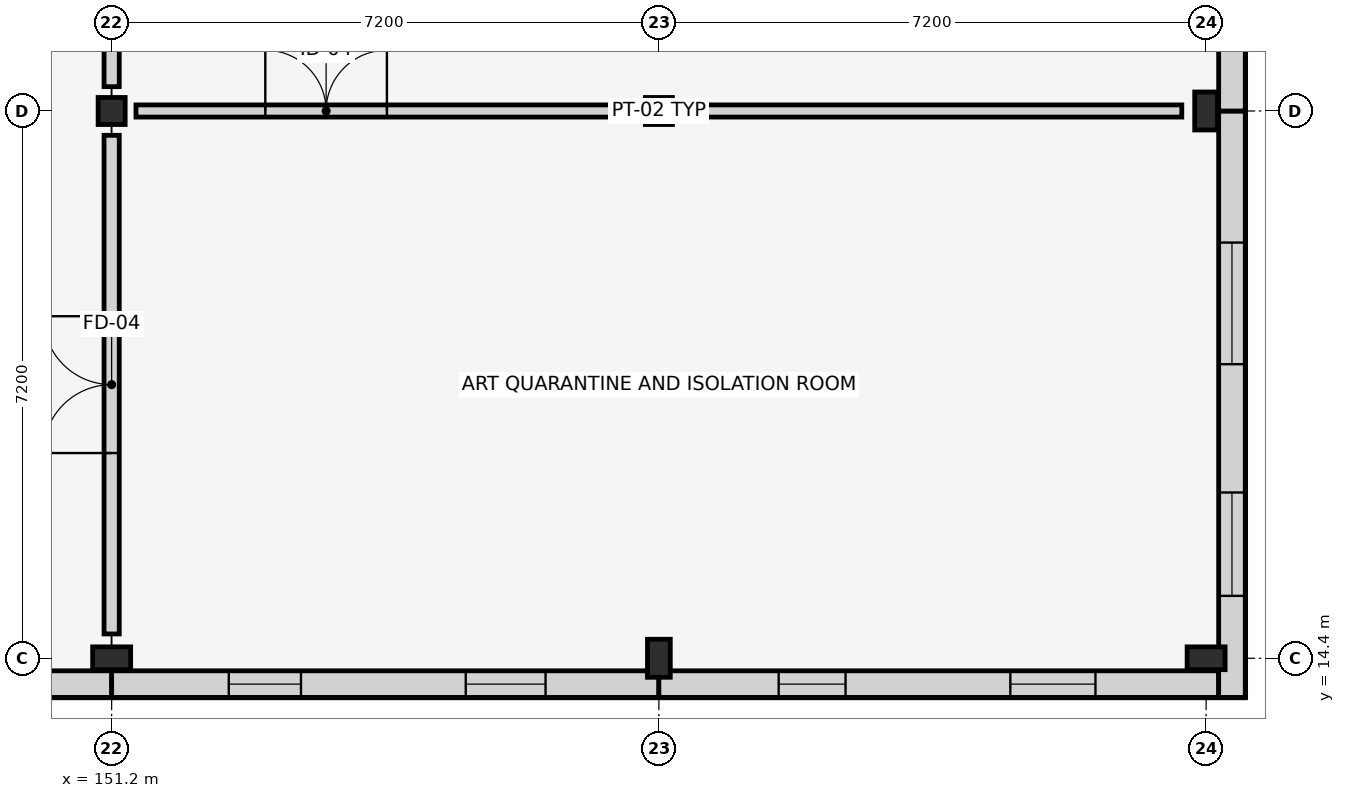
"""IFC4 building model, lengths in metres.
Left out: names, types, materials, properties, quantities, classifications, styles, units other than length and angle.
Written with IfcOpenShell. Run it as: python <this file> out.ifc"""

import sys

from ifc_helpers import new_model, si_unit, direction, frame, frame_2d, origin, origin_2d, place, context, subcontext, project, spatial, rectangle, hollow_circle, i_section, extrude, element, fill, save


model = new_model("IFC4")
c1 = context("Model", 3, precision=1e-05, world=origin(), true_north=direction((0.0, 1.0)))
c2 = subcontext(c1, "Body", "Model", "MODEL_VIEW")
j1 = project(units=[si_unit("LENGTHUNIT", "METRE"), si_unit("PLANEANGLEUNIT", "RADIAN")], contexts=[c1])
p1 = place(None, origin())
s1 = spatial("IfcSite", under=j1, at=p1, CompositionType="ELEMENT")
p2 = place(p1, origin())
s2 = spatial("IfcBuilding", under=s1, at=p2, CompositionType="ELEMENT")
p3 = place(p2, origin())
s3 = spatial("IfcBuildingStorey", under=s2, at=p3, CompositionType="ELEMENT", Elevation=0.0)
p4 = place(p3, frame((151.2, 14.4, 0.0), z_axis=(0.0, 0.0, 1.0), x_axis=(0.0, 1.0, 0.0)))
e1 = element("IfcColumn", 1, at=p4, inside=s3, PredefinedType="COLUMN", context=c2, shape_type="SweptSolid", body=[
    extrude(i_section(OverallWidth=0.3, OverallDepth=0.5, WebThickness=0.014, FlangeThickness=0.028, FilletRadius=0.027, at=origin_2d()), origin(), (0.0, 0.0, 1.0), 4.5),
])
p5 = place(p3, frame((151.2, 21.6, 0.0), z_axis=(0.0, 0.0, 1.0), x_axis=(1.0, 0.0, 0.0)))
e2 = element("IfcColumn", 2, at=p5, inside=s3, PredefinedType="COLUMN", context=c2, shape_type="SweptSolid", body=[
    extrude(hollow_circle(Radius=0.178, WallThickness=0.014, at=origin_2d()), origin(), (0.0, 0.0, 1.0), 4.5),
])
p6 = place(p3, frame((158.4, 14.4, 0.0), z_axis=(0.0, 0.0, 1.0), x_axis=(1.0, 0.0, 0.0)))
e3 = element("IfcColumn", 3, at=p6, inside=s3, PredefinedType="COLUMN", context=c2, shape_type="SweptSolid", body=[
    extrude(i_section(OverallWidth=0.3, OverallDepth=0.5, WebThickness=0.014, FlangeThickness=0.028, FilletRadius=0.027, at=origin_2d()), origin(), (0.0, 0.0, 1.0), 4.5),
])
p7 = place(p3, frame((158.4, 21.6, 0.0), z_axis=(0.0, 0.0, 1.0), x_axis=(0.0, 1.0, 0.0)))
e4 = element("IfcColumn", 4, at=p7, inside=s3, PredefinedType="COLUMN", context=c2, shape_type="SweptSolid", body=[
    extrude(hollow_circle(Radius=0.178, WallThickness=0.014, at=origin_2d()), origin(), (0.0, 0.0, 1.0), 4.5),
])
for number, where, z_axis, x_axis in (
    (5, (165.6, 14.4, 0.0), (0.0, 0.0, 1.0), (0.0, 1.0, 0.0)),
    (6, (165.6, 21.6, 0.0), (0.0, 0.0, 1.0), (1.0, 0.0, 0.0)),
):
    element("IfcColumn", number, at=place(p3, frame(where, z_axis=z_axis, x_axis=x_axis)), inside=s3, PredefinedType="COLUMN", context=c2, shape_type="SweptSolid", body=[
        extrude(i_section(OverallWidth=0.3, OverallDepth=0.5, WebThickness=0.014, FlangeThickness=0.028, FilletRadius=0.027, at=origin_2d()), origin(), (0.0, 0.0, 1.0), 4.5),
    ])
p8 = place(p3, frame((144.0, 14.06, 0.0), z_axis=(0.0, 0.0, 1.0), x_axis=(1.0, 0.0, 0.0)))
e7 = element("IfcWall", 7, at=p8, inside=s3, PredefinedType="STANDARD", context=c2, shape_type="SweptSolid", body=[
    extrude(rectangle(XDim=7.2, YDim=0.35, at=frame_2d((3.6, 0.0))), origin(), (0.0, 0.0, 1.0), 4.5),
])
p9 = place(p8, frame((1.241, 0.0, 0.9)))
e8 = element("IfcOpeningElement", 8, at=p9, cuts=e7, PredefinedType="OPENING", context=c2, shape_type="SweptSolid", body=[
    extrude(rectangle(XDim=1.55, YDim=2.35, at=frame_2d((0.775, 1.175))), frame((0.0, 0.185, 0.0), z_axis=(0.0, -1.0, 0.0), x_axis=(1.0, 0.0, 0.0)), (0.0, 0.0, 1.0), 0.37),
])
p10 = place(p8, frame((4.334, 0.0, 0.9)))
e9 = element("IfcOpeningElement", 9, at=p10, cuts=e7, PredefinedType="OPENING", context=c2, shape_type="SweptSolid", body=[
    extrude(rectangle(XDim=1.7, YDim=2.4, at=frame_2d((0.85, 1.2))), frame((0.0, 0.185, 0.0), z_axis=(0.0, -1.0, 0.0), x_axis=(1.0, 0.0, 0.0)), (0.0, 0.0, 1.0), 0.37),
])
p11 = place(p3, frame((151.2, 14.06, 0.0), z_axis=(0.0, 0.0, 1.0), x_axis=(1.0, 0.0, 0.0)))
e10 = element("IfcWall", 10, at=p11, inside=s3, PredefinedType="STANDARD", context=c2, shape_type="SweptSolid", body=[
    extrude(rectangle(XDim=7.2, YDim=0.35, at=frame_2d((3.6, 0.0))), origin(), (0.0, 0.0, 1.0), 4.5),
])
p12 = place(p11, frame((1.541, 0.0, 0.9)))
e11 = element("IfcOpeningElement", 11, at=p12, cuts=e10, PredefinedType="OPENING", context=c2, shape_type="SweptSolid", body=[
    extrude(rectangle(XDim=0.95, YDim=1.9, at=frame_2d((0.475, 0.95))), frame((0.0, 0.185, 0.0), z_axis=(0.0, -1.0, 0.0), x_axis=(1.0, 0.0, 0.0)), (0.0, 0.0, 1.0), 0.37),
])
p13 = place(p11, frame((4.659, 0.0, 0.9)))
e12 = element("IfcOpeningElement", 12, at=p13, cuts=e10, PredefinedType="OPENING", context=c2, shape_type="SweptSolid", body=[
    extrude(rectangle(XDim=1.05, YDim=2.15, at=frame_2d((0.525, 1.075))), frame((0.0, 0.185, 0.0), z_axis=(0.0, -1.0, 0.0), x_axis=(1.0, 0.0, 0.0)), (0.0, 0.0, 1.0), 0.37),
])
p14 = place(p3, frame((158.4, 14.06, 0.0), z_axis=(0.0, 0.0, 1.0), x_axis=(1.0, 0.0, 0.0)))
e13 = element("IfcWall", 13, at=p14, inside=s3, PredefinedType="STANDARD", context=c2, shape_type="SweptSolid", body=[
    extrude(rectangle(XDim=7.365, YDim=0.35, at=frame_2d((3.683, 0.0))), origin(), (0.0, 0.0, 1.0), 4.5),
])
p15 = place(p14, frame((1.576, 0.0, 0.9)))
e14 = element("IfcOpeningElement", 14, at=p15, cuts=e13, PredefinedType="OPENING", context=c2, shape_type="SweptSolid", body=[
    extrude(rectangle(XDim=0.88, YDim=1.54, at=frame_2d((0.44, 0.77))), frame((0.0, 0.185, 0.0), z_axis=(0.0, -1.0, 0.0), x_axis=(1.0, 0.0, 0.0)), (0.0, 0.0, 1.0), 0.37),
])
p16 = place(p14, frame((4.624, 0.0, 0.9)))
e15 = element("IfcOpeningElement", 15, at=p16, cuts=e13, PredefinedType="OPENING", context=c2, shape_type="SweptSolid", body=[
    extrude(rectangle(XDim=1.12, YDim=1.54, at=frame_2d((0.56, 0.77))), frame((0.0, 0.185, 0.0), z_axis=(0.0, -1.0, 0.0), x_axis=(1.0, 0.0, 0.0)), (0.0, 0.0, 1.0), 0.37),
])
p17 = place(p3, frame((165.94, 13.885, 0.0), z_axis=(0.0, 0.0, 1.0), x_axis=(0.0, 1.0, 0.0)))
e16 = element("IfcWall", 16, at=p17, inside=s3, PredefinedType="STANDARD", context=c2, shape_type="SweptSolid", body=[
    extrude(rectangle(XDim=7.715, YDim=0.35, at=frame_2d((3.857, 0.0))), origin(), (0.0, 0.0, 1.0), 4.5),
])
p18 = place(p17, frame((1.336, 0.0, 0.9)))
e17 = element("IfcOpeningElement", 17, at=p18, cuts=e16, PredefinedType="OPENING", context=c2, shape_type="SweptSolid", body=[
    extrude(rectangle(XDim=1.36, YDim=1.54, at=frame_2d((0.68, 0.77))), frame((0.0, 0.185, 0.0), z_axis=(0.0, -1.0, 0.0), x_axis=(1.0, 0.0, 0.0)), (0.0, 0.0, 1.0), 0.37),
])
p19 = place(p17, frame((4.384, 0.0, 0.9)))
e18 = element("IfcOpeningElement", 18, at=p19, cuts=e16, PredefinedType="OPENING", context=c2, shape_type="SweptSolid", body=[
    extrude(rectangle(XDim=1.6, YDim=1.54, at=frame_2d((0.8, 0.77))), frame((0.0, 0.185, 0.0), z_axis=(0.0, -1.0, 0.0), x_axis=(1.0, 0.0, 0.0)), (0.0, 0.0, 1.0), 0.37),
])
p20 = place(p3, frame((165.94, 21.6, 0.0), z_axis=(0.0, 0.0, 1.0), x_axis=(0.0, 1.0, 0.0)))
e19 = element("IfcWall", 19, at=p20, inside=s3, PredefinedType="STANDARD", context=c2, shape_type="SweptSolid", body=[
    extrude(rectangle(XDim=7.2, YDim=0.35, at=frame_2d((3.6, 0.0))), origin(), (0.0, 0.0, 1.0), 4.5),
])
p21 = place(p20, frame((1.4, 0.0, 0.0)))
e20 = element("IfcOpeningElement", 20, at=p21, cuts=e19, PredefinedType="OPENING", context=c2, shape_type="SweptSolid", body=[
    extrude(rectangle(XDim=4.4, YDim=3.6, at=frame_2d((2.2, 1.8))), frame((0.0, 0.185, 0.0), z_axis=(0.0, -1.0, 0.0), x_axis=(1.0, 0.0, 0.0)), (0.0, 0.0, 1.0), 0.37),
])
p22 = place(p3, frame((151.2, 21.92, 0.0), z_axis=(0.0, 0.0, 1.0), x_axis=(0.0, 1.0, 0.0)))
e21 = element("IfcWall", 21, at=p22, inside=s3, PredefinedType="PARTITIONING", context=c2, shape_type="SweptSolid", body=[
    extrude(rectangle(XDim=13.76, YDim=0.2, at=frame_2d((6.88, 0.0))), origin(), (0.0, 0.0, 1.0), 3.45),
])
p23 = place(p22, frame((1.602, 0.0, 0.0)))
e22 = element("IfcOpeningElement", 22, at=p23, cuts=e21, PredefinedType="OPENING", context=c2, shape_type="SweptSolid", body=[
    extrude(rectangle(XDim=1.8, YDim=2.4, at=frame_2d((0.9, 1.2))), frame((0.0, 0.11, 0.0), z_axis=(0.0, -1.0, 0.0), x_axis=(1.0, 0.0, 0.0)), (0.0, 0.0, 1.0), 0.22),
])
p24 = place(p3, frame((151.52, 21.6, 0.0), z_axis=(0.0, 0.0, 1.0), x_axis=(1.0, 0.0, 0.0)))
e23 = element("IfcWall", 23, at=p24, inside=s3, PredefinedType="PARTITIONING", context=c2, shape_type="SweptSolid", body=[
    extrude(rectangle(XDim=13.76, YDim=0.16, at=frame_2d((6.88, 0.0))), origin(), (0.0, 0.0, 1.0), 3.45),
])
p25 = place(p24, frame((1.702, 0.0, 0.0)))
e24 = element("IfcOpeningElement", 24, at=p25, cuts=e23, PredefinedType="OPENING", context=c2, shape_type="SweptSolid", body=[
    extrude(rectangle(XDim=1.6, YDim=2.35, at=frame_2d((0.8, 1.175))), frame((0.0, 0.09, 0.0), z_axis=(0.0, -1.0, 0.0), x_axis=(1.0, 0.0, 0.0)), (0.0, 0.0, 1.0), 0.18),
])
p26 = place(p3, frame((151.2, 14.72, 0.0), z_axis=(0.0, 0.0, 1.0), x_axis=(0.0, 1.0, 0.0)))
e25 = element("IfcWall", 25, at=p26, inside=s3, PredefinedType="PARTITIONING", context=c2, shape_type="SweptSolid", body=[
    extrude(rectangle(XDim=6.56, YDim=0.2, at=frame_2d((3.28, 0.0))), origin(), (0.0, 0.0, 1.0), 3.45),
])
p27 = place(p26, frame((2.38, 0.0, 0.0)))
e26 = element("IfcOpeningElement", 26, at=p27, cuts=e25, PredefinedType="OPENING", context=c2, shape_type="SweptSolid", body=[
    extrude(rectangle(XDim=1.8, YDim=2.4, at=frame_2d((0.9, 1.2))), frame((0.0, 0.11, 0.0), z_axis=(0.0, -1.0, 0.0), x_axis=(1.0, 0.0, 0.0)), (0.0, 0.0, 1.0), 0.22),
])
p28 = place(p12, origin())
e27 = element("IfcWindow", 27, at=p28, inside=s3, PartitioningType="SINGLE_PANEL", PredefinedType="WINDOW", context=c2, shape_type="SweptSolid", body=[
    extrude(rectangle(XDim=0.95, YDim=1.9, at=frame_2d((0.475, 0.95))), frame((0.0, 0.03, 0.0), z_axis=(0.0, -1.0, 0.0), x_axis=(1.0, 0.0, 0.0)), (0.0, 0.0, 1.0), 0.06),
])
fill(e11, e27)
p29 = place(p13, origin())
e28 = element("IfcWindow", 28, at=p29, inside=s3, PartitioningType="SINGLE_PANEL", PredefinedType="WINDOW", context=c2, shape_type="SweptSolid", body=[
    extrude(rectangle(XDim=1.05, YDim=2.15, at=frame_2d((0.525, 1.075))), frame((0.0, 0.03, 0.0), z_axis=(0.0, -1.0, 0.0), x_axis=(1.0, 0.0, 0.0)), (0.0, 0.0, 1.0), 0.06),
])
fill(e12, e28)
p30 = place(p15, origin())
e29 = element("IfcWindow", 29, at=p30, inside=s3, PartitioningType="SINGLE_PANEL", PredefinedType="WINDOW", context=c2, shape_type="SweptSolid", body=[
    extrude(rectangle(XDim=0.88, YDim=1.54, at=frame_2d((0.44, 0.77))), frame((0.0, 0.03, 0.0), z_axis=(0.0, -1.0, 0.0), x_axis=(1.0, 0.0, 0.0)), (0.0, 0.0, 1.0), 0.06),
])
fill(e14, e29)
p31 = place(p16, origin())
e30 = element("IfcWindow", 30, at=p31, inside=s3, PartitioningType="SINGLE_PANEL", PredefinedType="WINDOW", context=c2, shape_type="SweptSolid", body=[
    extrude(rectangle(XDim=1.12, YDim=1.54, at=frame_2d((0.56, 0.77))), frame((0.0, 0.03, 0.0), z_axis=(0.0, -1.0, 0.0), x_axis=(1.0, 0.0, 0.0)), (0.0, 0.0, 1.0), 0.06),
])
fill(e15, e30)
p32 = place(p18, origin())
e31 = element("IfcWindow", 31, at=p32, inside=s3, PartitioningType="SINGLE_PANEL", PredefinedType="WINDOW", context=c2, shape_type="SweptSolid", body=[
    extrude(rectangle(XDim=1.36, YDim=1.54, at=frame_2d((0.68, 0.77))), frame((0.0, 0.03, 0.0), z_axis=(0.0, -1.0, 0.0), x_axis=(1.0, 0.0, 0.0)), (0.0, 0.0, 1.0), 0.06),
])
fill(e17, e31)
p33 = place(p19, origin())
e32 = element("IfcWindow", 32, at=p33, inside=s3, PartitioningType="SINGLE_PANEL", PredefinedType="WINDOW", context=c2, shape_type="SweptSolid", body=[
    extrude(rectangle(XDim=1.6, YDim=1.54, at=frame_2d((0.8, 0.77))), frame((0.0, 0.03, 0.0), z_axis=(0.0, -1.0, 0.0), x_axis=(1.0, 0.0, 0.0)), (0.0, 0.0, 1.0), 0.06),
])
fill(e18, e32)
p34 = place(p25, origin())
e33 = element("IfcDoor", 33, at=p34, inside=s3, OperationType="DOUBLE_DOOR_SINGLE_SWING", PredefinedType="DOOR", context=c2, shape_type="SweptSolid", body=[
    extrude(rectangle(XDim=1.6, YDim=2.35, at=frame_2d((0.8, 1.175))), frame((0.0, 0.025, 0.0), z_axis=(0.0, -1.0, 0.0), x_axis=(1.0, 0.0, 0.0)), (0.0, 0.0, 1.0), 0.05),
])
fill(e24, e33)
p35 = place(p27, origin())
e34 = element("IfcDoor", 34, at=p35, inside=s3, OperationType="DOUBLE_DOOR_SINGLE_SWING", PredefinedType="DOOR", context=c2, shape_type="SweptSolid", body=[
    extrude(rectangle(XDim=1.8, YDim=2.4, at=frame_2d((0.9, 1.2))), frame((0.0, 0.025, 0.0), z_axis=(0.0, -1.0, 0.0), x_axis=(1.0, 0.0, 0.0)), (0.0, 0.0, 1.0), 0.05),
])
fill(e26, e34)
save(model, sys.argv[1])
